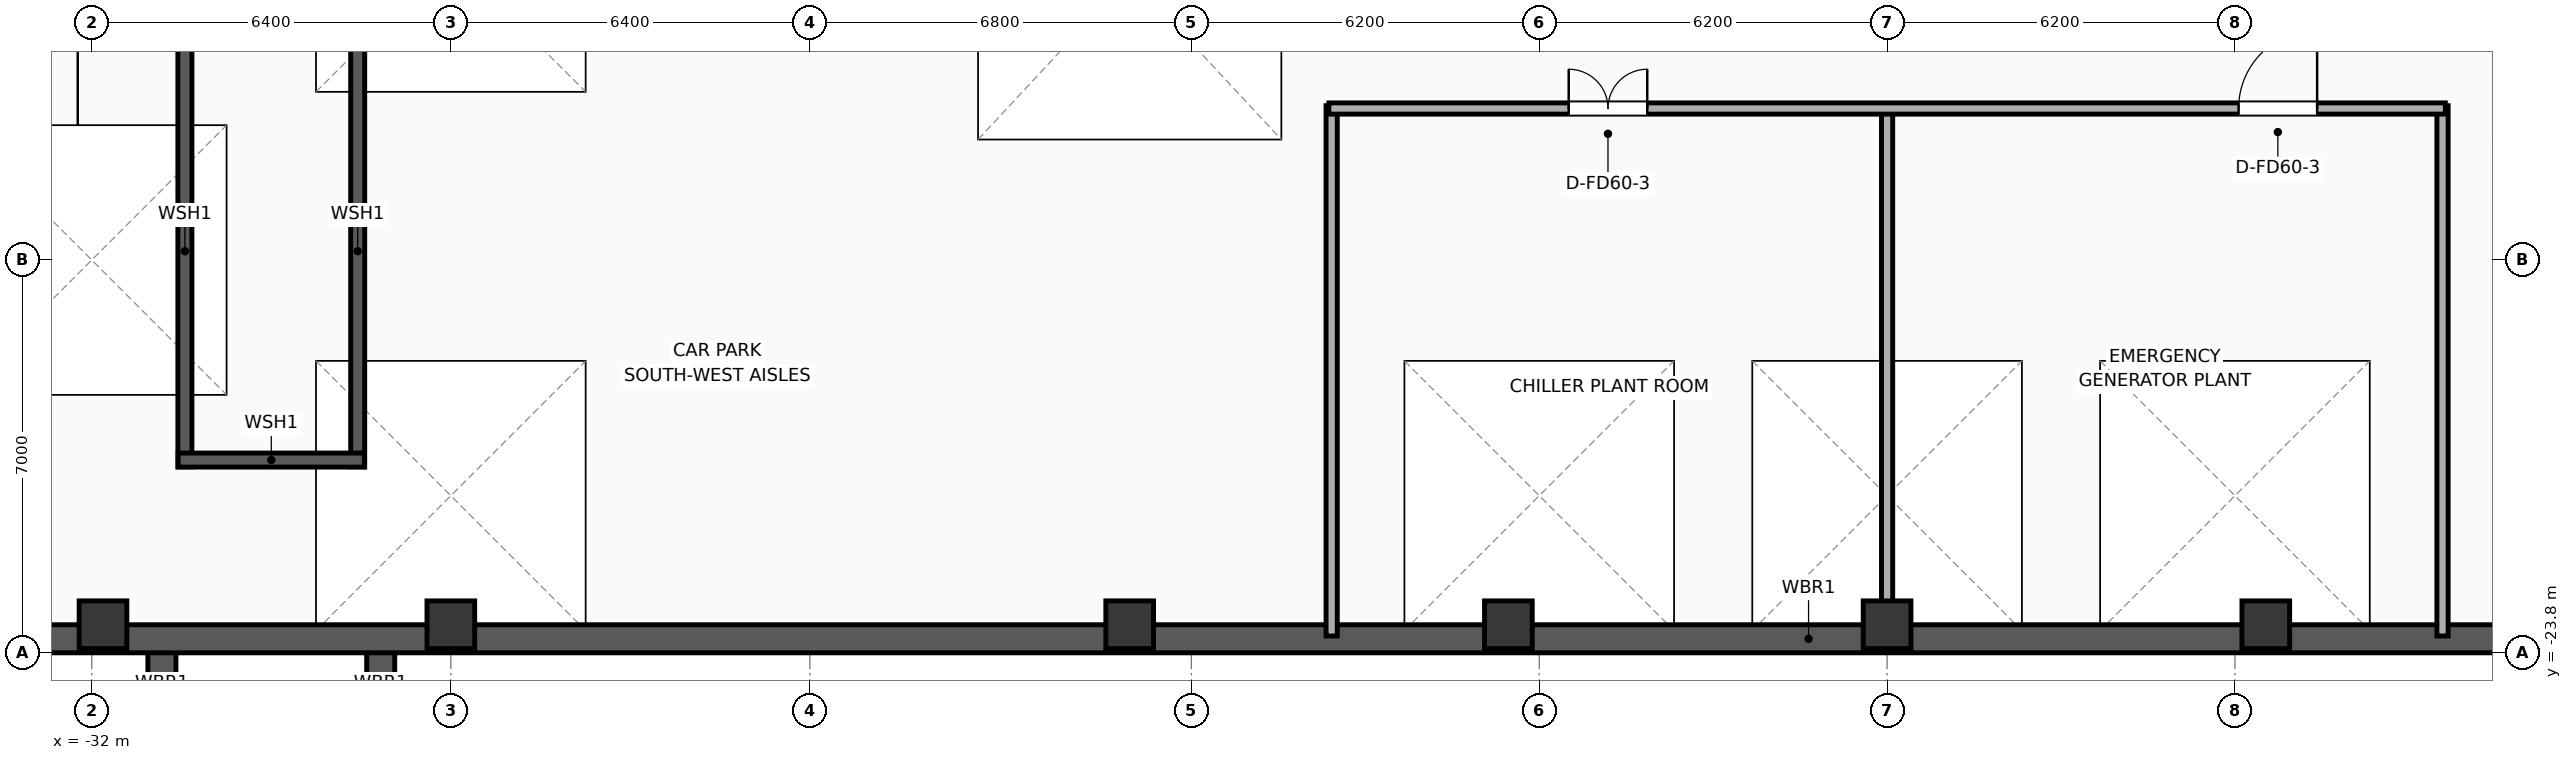
"""IFC4 building model, lengths in metres.
Left out: names, types, materials, properties, quantities, classifications, styles, units other than length and angle.
Written with IfcOpenShell. Run it as: python <this file> out.ifc"""

import sys

from ifc_helpers import new_model, si_unit, direction, frame, frame_2d, origin, origin_2d, place, context, subcontext, project, spatial, rectangle, extrude, element, fill, save


model = new_model("IFC4")
c1 = context("Model", 3, precision=1e-05, world=origin(), true_north=direction((0.0, 1.0)))
c2 = subcontext(c1, "Body", "Model", "MODEL_VIEW")
j1 = project(units=[si_unit("LENGTHUNIT", "METRE"), si_unit("PLANEANGLEUNIT", "RADIAN")], contexts=[c1])
p1 = place(None, origin())
s1 = spatial("IfcSite", under=j1, at=p1, CompositionType="ELEMENT")
p2 = place(p1, origin())
s2 = spatial("IfcBuilding", under=s1, at=p2, CompositionType="ELEMENT")
p3 = place(p2, frame((0.0, 0.0, -10.4)))
s3 = spatial("IfcBuildingStorey", under=s2, at=p3, CompositionType="ELEMENT", Elevation=-10.4)
for number, where, z_axis, x_axis in (
    (1, (-30.75, -26.95, 0.0), (0.0, 0.0, 1.0), (0.0, 1.0, 0.0)),
    (2, (-26.85, -26.95, 0.0), (0.0, 0.0, 1.0), (0.0, 1.0, 0.0)),
):
    element("IfcWall", number, at=place(p3, frame(where, z_axis=z_axis, x_axis=x_axis)), inside=s3, PredefinedType="USERDEFINED", context=c2, shape_type="SweptSolid", body=[
        extrude(rectangle(XDim=3.4, YDim=0.5, at=frame_2d((1.7, 0.0))), origin(), (0.0, 0.0, 1.0), 5.2),
    ])
for number, where, z_axis, x_axis in (
    (3, (-30.34, -20.485, 0.0), (0.0, 0.0, 1.0), (0.0, 1.0, 0.0)),
    (4, (-27.26, -20.485, 0.0), (0.0, 0.0, 1.0), (0.0, 1.0, 0.0)),
):
    element("IfcWall", number, at=place(p3, frame(where, z_axis=z_axis, x_axis=x_axis)), inside=s3, PredefinedType="SOLIDWALL", context=c2, shape_type="SweptSolid", body=[
        extrude(rectangle(XDim=7.685, YDim=0.25, at=frame_2d((3.843, 0.0))), origin(), (0.0, 0.0, 1.0), 4.88),
    ])
p4 = place(p3, frame((-30.46, -20.365, 0.0), z_axis=(0.0, 0.0, 1.0), x_axis=(1.0, 0.0, 0.0)))
e5 = element("IfcWall", 5, at=p4, inside=s3, PredefinedType="SOLIDWALL", context=c2, shape_type="SweptSolid", body=[
    extrude(rectangle(XDim=3.32, YDim=0.25, at=frame_2d((1.66, 0.0))), origin(), (0.0, 0.0, 1.0), 4.88),
])
p5 = place(p3, frame((-38.4, -23.55, 0.0), z_axis=(0.0, 0.0, 1.0), x_axis=(1.0, 0.0, 0.0)))
e6 = element("IfcWall", 6, at=p5, inside=s3, PredefinedType="USERDEFINED", context=c2, shape_type="SweptSolid", body=[
    extrude(rectangle(XDim=74.0, YDim=0.5, at=frame_2d((37.0, 0.0))), origin(), (0.0, 0.0, 1.0), 4.88),
])
for number, where, z_axis, x_axis in (
    (7, (-31.8, -23.3, 0.0), (0.0, 0.0, 1.0), (1.0, 0.0, 0.0)),
    (8, (-25.6, -23.3, 0.0), (0.0, 0.0, 1.0), (1.0, 0.0, 0.0)),
    (9, (-13.5, -23.3, 0.0), (0.0, 0.0, 1.0), (1.0, 0.0, 0.0)),
    (10, (-6.75, -23.3, 0.0), (0.0, 0.0, 1.0), (1.0, 0.0, 0.0)),
    (11, (0.0, -23.3, 0.0), (0.0, 0.0, 1.0), (1.0, 0.0, 0.0)),
    (12, (6.75, -23.3, 0.0), (0.0, 0.0, 1.0), (1.0, 0.0, 0.0)),
):
    element("IfcColumn", number, at=place(p3, frame(where, z_axis=z_axis, x_axis=x_axis)), inside=s3, PredefinedType="COLUMN", context=c2, shape_type="SweptSolid", body=[
        extrude(rectangle(XDim=0.85, YDim=0.85, at=origin_2d()), origin(), (0.0, 0.0, 1.0), 5.2),
    ])
p6 = place(p3, frame((0.0, -23.5, 0.0), z_axis=(0.0, 0.0, 1.0), x_axis=(0.0, 1.0, 0.0)))
e13 = element("IfcWall", 13, at=p6, inside=s3, PredefinedType="PARTITIONING", context=c2, shape_type="SweptSolid", body=[
    extrude(rectangle(XDim=9.45, YDim=0.2, at=frame_2d((4.725, 0.0))), origin(), (0.0, 0.0, 1.0), 4.17),
])
for number, where, z_axis, x_axis in (
    (14, (-9.9, -23.5, 0.0), (0.0, 0.0, 1.0), (0.0, 1.0, 0.0)),
    (15, (9.9, -23.5, 0.0), (0.0, 0.0, 1.0), (0.0, 1.0, 0.0)),
):
    element("IfcWall", number, at=place(p3, frame(where, z_axis=z_axis, x_axis=x_axis)), inside=s3, PredefinedType="PARTITIONING", context=c2, shape_type="SweptSolid", body=[
        extrude(rectangle(XDim=9.45, YDim=0.2, at=frame_2d((4.725, 0.0))), origin(), (0.0, 0.0, 1.0), 4.88),
    ])
p7 = place(p3, frame((-9.95, -14.1, 0.0), z_axis=(0.0, 0.0, 1.0), x_axis=(1.0, 0.0, 0.0)))
e16 = element("IfcWall", 16, at=p7, inside=s3, PredefinedType="PARTITIONING", context=c2, shape_type="SweptSolid", body=[
    extrude(rectangle(XDim=19.9, YDim=0.2, at=frame_2d((9.95, 0.0))), origin(), (0.0, 0.0, 1.0), 4.88),
])
p8 = place(p7, frame((4.275, 0.0, 0.0)))
e17 = element("IfcOpeningElement", 17, at=p8, cuts=e16, PredefinedType="OPENING", context=c2, shape_type="SweptSolid", body=[
    extrude(rectangle(XDim=1.4, YDim=2.05, at=frame_2d((0.7, 1.025))), frame((0.0, 0.11, 0.0), z_axis=(0.0, -1.0, 0.0), x_axis=(1.0, 0.0, 0.0)), (0.0, 0.0, 1.0), 0.22),
])
p9 = place(p7, frame((16.215, 0.0, 0.0)))
e18 = element("IfcOpeningElement", 18, at=p9, cuts=e16, PredefinedType="OPENING", context=c2, shape_type="SweptSolid", body=[
    extrude(rectangle(XDim=1.4, YDim=2.05, at=frame_2d((0.7, 1.025))), frame((0.0, 0.11, 0.0), z_axis=(0.0, -1.0, 0.0), x_axis=(1.0, 0.0, 0.0)), (0.0, 0.0, 1.0), 0.22),
])
p10 = place(p8, origin())
e19 = element("IfcDoor", 19, at=p10, inside=s3, OperationType="DOUBLE_DOOR_SINGLE_SWING", PredefinedType="DOOR", context=c2, shape_type="SweptSolid", body=[
    extrude(rectangle(XDim=1.4, YDim=2.05, at=frame_2d((0.7, 1.025))), frame((0.0, 0.025, 0.0), z_axis=(0.0, -1.0, 0.0), x_axis=(1.0, 0.0, 0.0)), (0.0, 0.0, 1.0), 0.05),
])
fill(e17, e19)
p11 = place(p9, origin())
e20 = element("IfcDoor", 20, at=p11, inside=s3, OperationType="SINGLE_SWING_RIGHT", PredefinedType="DOOR", context=c2, shape_type="SweptSolid", body=[
    extrude(rectangle(XDim=1.4, YDim=2.05, at=frame_2d((0.7, 1.025))), frame((0.0, 0.025, 0.0), z_axis=(0.0, -1.0, 0.0), x_axis=(1.0, 0.0, 0.0)), (0.0, 0.0, 1.0), 0.05),
])
fill(e18, e20)
save(model, sys.argv[1])
